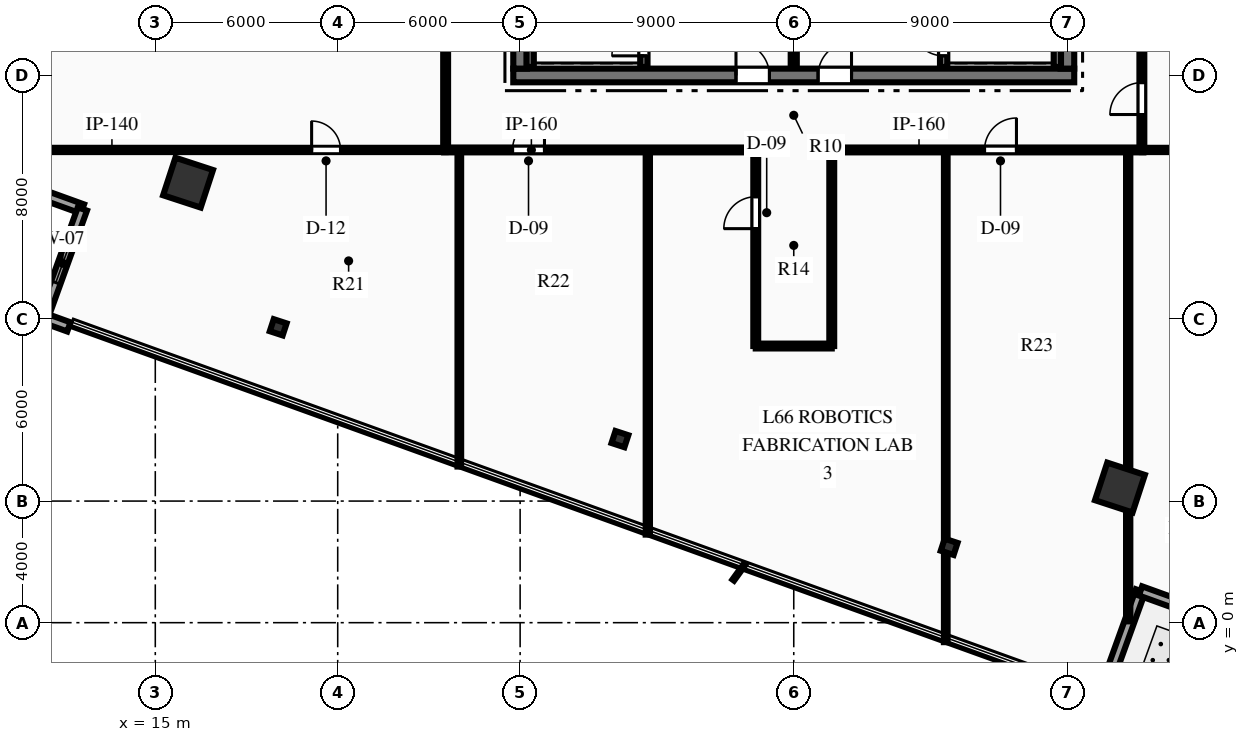
"""IFC4 building model, lengths in metres.
Left out: names, types, materials, properties, quantities, classifications, styles, units other than length and angle.
Written with IfcOpenShell. Run it as: python <this file> out.ifc"""

import sys

from ifc_helpers import new_model, si_unit, direction, frame, frame_2d, origin, origin_2d, place, context, subcontext, project, spatial, rectangle, hollow_rectangle, i_section, extrude, element, fill, save


model = new_model("IFC4")
c1 = context("Model", 3, precision=1e-05, world=origin(), true_north=direction((0.0, 1.0)))
c2 = subcontext(c1, "Body", "Model", "MODEL_VIEW")
j1 = project(units=[si_unit("LENGTHUNIT", "METRE"), si_unit("PLANEANGLEUNIT", "RADIAN")], contexts=[c1])
p1 = place(None, origin())
s1 = spatial("IfcSite", under=j1, at=p1, CompositionType="ELEMENT")
p2 = place(p1, origin())
s2 = spatial("IfcBuilding", under=s1, at=p2, CompositionType="ELEMENT")
p3 = place(p2, frame((0.0, 0.0, 263.7)))
s3 = spatial("IfcBuildingStorey", under=s2, at=p3, CompositionType="ELEMENT", Elevation=263.7)
p4 = place(p3, frame((26.775, 18.0, 0.0), z_axis=(0.0, 0.0, 1.0), x_axis=(1.0, 0.0, 0.0)))
e1 = element("IfcWall", 1, at=p4, inside=s3, PredefinedType="SHEAR", context=c2, shape_type="SweptSolid", body=[
    extrude(rectangle(XDim=18.45, YDim=0.45, at=frame_2d((9.225, 0.0))), origin(), (0.0, 0.0, 1.0), 3.75),
])
p5 = place(p4, frame((7.325, 0.0, 0.0)))
e2 = element("IfcOpeningElement", 2, at=p5, cuts=e1, PredefinedType="OPENING", context=c2, shape_type="SweptSolid", body=[
    extrude(rectangle(XDim=1.1, YDim=2.15, at=frame_2d((0.55, 1.075))), frame((0.0, 0.235, 0.0), z_axis=(0.0, -1.0, 0.0), x_axis=(1.0, 0.0, 0.0)), (0.0, 0.0, 1.0), 0.47),
])
p6 = place(p4, frame((10.025, 0.0, 0.0)))
e3 = element("IfcOpeningElement", 3, at=p6, cuts=e1, PredefinedType="OPENING", context=c2, shape_type="SweptSolid", body=[
    extrude(rectangle(XDim=1.1, YDim=2.15, at=frame_2d((0.55, 1.075))), frame((0.0, 0.235, 0.0), z_axis=(0.0, -1.0, 0.0), x_axis=(1.0, 0.0, 0.0)), (0.0, 0.0, 1.0), 0.47),
])
p7 = place(p3, frame((27.0, 18.225, 0.0), z_axis=(0.0, 0.0, 1.0), x_axis=(0.0, 1.0, 0.0)))
e4 = element("IfcWall", 4, at=p7, inside=s3, PredefinedType="SHEAR", context=c2, shape_type="SweptSolid", body=[
    extrude(rectangle(XDim=15.55, YDim=0.45, at=frame_2d((7.775, 0.0))), origin(), (0.0, 0.0, 1.0), 3.75),
])
p8 = place(p7, frame((10.015, 0.0, 0.0)))
e5 = element("IfcOpeningElement", 5, at=p8, cuts=e4, PredefinedType="OPENING", context=c2, shape_type="SweptSolid", body=[
    extrude(rectangle(XDim=1.4, YDim=2.2, at=frame_2d((0.7, 1.1))), frame((0.0, 0.235, 0.0), z_axis=(0.0, -1.0, 0.0), x_axis=(1.0, 0.0, 0.0)), (0.0, 0.0, 1.0), 0.47),
])
p9 = place(p3, frame((45.0, 18.225, 0.0), z_axis=(0.0, 0.0, 1.0), x_axis=(0.0, 1.0, 0.0)))
e6 = element("IfcWall", 6, at=p9, inside=s3, PredefinedType="SHEAR", context=c2, shape_type="SweptSolid", body=[
    extrude(rectangle(XDim=15.55, YDim=0.45, at=frame_2d((7.775, 0.0))), origin(), (0.0, 0.0, 1.0), 3.75),
])
p10 = place(p9, frame((10.015, 0.0, 0.0)))
e7 = element("IfcOpeningElement", 7, at=p10, cuts=e6, PredefinedType="OPENING", context=c2, shape_type="SweptSolid", body=[
    extrude(rectangle(XDim=1.4, YDim=2.2, at=frame_2d((0.7, 1.1))), frame((0.0, 0.235, 0.0), z_axis=(0.0, -1.0, 0.0), x_axis=(1.0, 0.0, 0.0)), (0.0, 0.0, 1.0), 0.47),
])
p11 = place(p3, frame((31.07, 18.28, 0.0), z_axis=(0.0, 0.0, 1.0), x_axis=(0.0, 1.0, 0.0)))
e8 = element("IfcWall", 8, at=p11, inside=s3, PredefinedType="SHEAR", context=c2, shape_type="SweptSolid", body=[
    extrude(rectangle(XDim=8.26, YDim=0.24, at=frame_2d((4.13, 0.0))), origin(), (0.0, 0.0, 1.0), 3.75),
])
p12 = place(p11, frame((0.365, 0.0, 0.0)))
e9 = element("IfcOpeningElement", 9, at=p12, cuts=e8, PredefinedType="OPENING", context=c2, shape_type="SweptSolid", body=[
    extrude(rectangle(XDim=1.05, YDim=2.15, at=frame_2d((0.525, 1.075))), frame((0.0, 0.13, 0.0), z_axis=(0.0, -1.0, 0.0), x_axis=(1.0, 0.0, 0.0)), (0.0, 0.0, 1.0), 0.26),
])
p13 = place(p3, frame((27.33, 18.28, 0.0), z_axis=(0.0, 0.0, 1.0), x_axis=(0.0, 1.0, 0.0)))
e10 = element("IfcWall", 10, at=p13, inside=s3, PredefinedType="SHEAR", context=c2, shape_type="SweptSolid", body=[
    extrude(rectangle(XDim=8.26, YDim=0.24, at=frame_2d((4.13, 0.0))), origin(), (0.0, 0.0, 1.0), 3.75),
])
p14 = place(p3, frame((40.93, 18.28, 0.0), z_axis=(0.0, 0.0, 1.0), x_axis=(0.0, 1.0, 0.0)))
e11 = element("IfcWall", 11, at=p14, inside=s3, PredefinedType="SHEAR", context=c2, shape_type="SweptSolid", body=[
    extrude(rectangle(XDim=8.26, YDim=0.24, at=frame_2d((4.13, 0.0))), origin(), (0.0, 0.0, 1.0), 3.75),
])
p15 = place(p14, frame((0.365, 0.0, 0.0)))
e12 = element("IfcOpeningElement", 12, at=p15, cuts=e11, PredefinedType="OPENING", context=c2, shape_type="SweptSolid", body=[
    extrude(rectangle(XDim=1.05, YDim=2.15, at=frame_2d((0.525, 1.075))), frame((0.0, 0.13, 0.0), z_axis=(0.0, -1.0, 0.0), x_axis=(1.0, 0.0, 0.0)), (0.0, 0.0, 1.0), 0.26),
])
p16 = place(p3, frame((44.67, 18.28, 0.0), z_axis=(0.0, 0.0, 1.0), x_axis=(0.0, 1.0, 0.0)))
e13 = element("IfcWall", 13, at=p16, inside=s3, PredefinedType="SHEAR", context=c2, shape_type="SweptSolid", body=[
    extrude(rectangle(XDim=8.26, YDim=0.24, at=frame_2d((4.13, 0.0))), origin(), (0.0, 0.0, 1.0), 3.75),
])
for number, where, z_axis, x_axis in (
    (14, (46.728, 4.445, 0.0), (0.0, 0.0, 1.0), (0.311, 0.95, 0.0)),
    (15, (16.077, 14.475, 0.0), (0.0, 0.0, 1.0), (0.311, 0.95, 0.0)),
):
    element("IfcColumn", number, at=place(p3, frame(where, z_axis=z_axis, x_axis=x_axis)), inside=s3, PredefinedType="COLUMN", context=c2, shape_type="SweptSolid", body=[
        extrude(hollow_rectangle(XDim=1.3, YDim=1.3, WallThickness=0.06, at=origin_2d()), origin(), (0.0, 0.0, 1.0), 3.75),
    ])
for number, where, z_axis, x_axis in (
    (16, (19.043, 9.716, 0.0), (0.0, 0.0, 1.0), (0.311, 0.95, 0.0)),
    (17, (30.283, 6.038, 0.0), (0.0, 0.0, 1.0), (0.311, 0.95, 0.0)),
    (18, (41.111, 2.495, 0.0), (0.0, 0.0, 1.0), (0.311, 0.95, 0.0)),
):
    element("IfcColumn", number, at=place(p3, frame(where, z_axis=z_axis, x_axis=x_axis)), inside=s3, PredefinedType="COLUMN", context=c2, shape_type="SweptSolid", body=[
        extrude(i_section(OverallWidth=0.416, OverallDepth=0.445, WebThickness=0.039, FlangeThickness=0.063, at=origin_2d()), origin(), (0.0, 0.0, 1.0), 3.75),
    ])
p17 = place(p3, frame((12.602, 13.609, 0.0), z_axis=(0.0, 0.0, 1.0), x_axis=(-0.940588101953, 0.339549734892, 0.0)))
e19 = element("IfcWall", 19, at=p17, inside=s3, PredefinedType="STANDARD", context=c2, shape_type="SweptSolid", body=[
    extrude(rectangle(XDim=3.8, YDim=0.32, at=frame_2d((1.9, 0.0))), origin(), (0.0, 0.0, 1.0), 3.48),
])
p18 = place(p3, frame((11.312, 10.034, 0.0), z_axis=(0.0, 0.0, 1.0), x_axis=(0.339549734892, 0.940588101953, 0.0)))
e20 = element("IfcWall", 20, at=p18, inside=s3, PredefinedType="STANDARD", context=c2, shape_type="SweptSolid", body=[
    extrude(rectangle(XDim=3.8, YDim=0.32, at=frame_2d((1.9, 0.0))), origin(), (0.0, 0.0, 1.0), 3.48),
])
p19 = place(p18, frame((1.225, 0.0, 0.85)))
e21 = element("IfcOpeningElement", 21, at=p19, cuts=e20, PredefinedType="OPENING", context=c2, shape_type="SweptSolid", body=[
    extrude(rectangle(XDim=1.35, YDim=1.95, at=frame_2d((0.675, 0.975))), frame((0.0, 0.17, 0.0), z_axis=(0.0, -1.0, 0.0), x_axis=(1.0, 0.0, 0.0)), (0.0, 0.0, 1.0), 0.34),
])
p20 = place(p3, frame((12.158, 9.729, 0.0), z_axis=(0.0, 0.0, 1.0), x_axis=(-0.940638134831, 0.339411106626, 0.0)))
e22 = element("IfcWall", 22, at=p20, inside=s3, PredefinedType="STANDARD", context=c2, shape_type="SweptSolid", body=[
    extrude(rectangle(XDim=0.9, YDim=0.32, at=frame_2d((0.45, 0.0))), origin(), (0.0, 0.0, 1.0), 3.48),
])
p21 = place(p3, frame((47.404, 1.045, 0.0), z_axis=(0.0, 0.0, 1.0), x_axis=(-0.339549734892, -0.940588101953, 0.0)))
e23 = element("IfcWall", 23, at=p21, inside=s3, PredefinedType="STANDARD", context=c2, shape_type="SweptSolid", body=[
    extrude(rectangle(XDim=3.8, YDim=0.32, at=frame_2d((1.9, 0.0))), origin(), (0.0, 0.0, 1.0), 3.48),
])
p22 = place(p3, frame((50.978, -0.245, 0.0), z_axis=(0.0, 0.0, 1.0), x_axis=(-0.940588101953, 0.339549734892, 0.0)))
e24 = element("IfcWall", 24, at=p22, inside=s3, PredefinedType="STANDARD", context=c2, shape_type="SweptSolid", body=[
    extrude(rectangle(XDim=3.8, YDim=0.32, at=frame_2d((1.9, 0.0))), origin(), (0.0, 0.0, 1.0), 3.48),
])
p23 = place(p22, frame((1.325, 0.0, 0.0)))
e25 = element("IfcOpeningElement", 25, at=p23, cuts=e24, PredefinedType="OPENING", context=c2, shape_type="SweptSolid", body=[
    extrude(rectangle(XDim=1.15, YDim=2.2, at=frame_2d((0.575, 1.1))), frame((0.0, 0.17, 0.0), z_axis=(0.0, -1.0, 0.0), x_axis=(1.0, 0.0, 0.0)), (0.0, 0.0, 1.0), 0.34),
])
p24 = place(p3, frame((36.0, 18.28, 0.0), z_axis=(0.0, 0.0, 1.0), x_axis=(0.0, 1.0, 0.0)))
e26 = element("IfcWall", 26, at=p24, inside=s3, PredefinedType="PARTITIONING", context=c2, shape_type="SweptSolid", body=[
    extrude(rectangle(XDim=3.77, YDim=0.2, at=frame_2d((1.885, 0.0))), origin(), (0.0, 0.0, 1.0), 3.48),
])
p25 = place(p3, frame((24.5, 15.55, 0.0), z_axis=(0.0, 0.0, 1.0), x_axis=(1.0, 0.0, 0.0)))
e27 = element("IfcWall", 27, at=p25, inside=s3, PredefinedType="PARTITIONING", context=c2, shape_type="SweptSolid", body=[
    extrude(rectangle(XDim=10.25, YDim=0.16, at=frame_2d((5.125, 0.0))), origin(), (0.0, 0.0, 1.0), 3.48),
])
p26 = place(p25, frame((2.251, 0.0, 0.0)))
e28 = element("IfcOpeningElement", 28, at=p26, cuts=e27, PredefinedType="OPENING", context=c2, shape_type="SweptSolid", body=[
    extrude(rectangle(XDim=1.05, YDim=2.15, at=frame_2d((0.525, 1.075))), frame((0.0, 0.09, 0.0), z_axis=(0.0, -1.0, 0.0), x_axis=(1.0, 0.0, 0.0)), (0.0, 0.0, 1.0), 0.18),
])
p27 = place(p3, frame((37.25, 15.55, 0.0), z_axis=(0.0, 0.0, 1.0), x_axis=(1.0, 0.0, 0.0)))
e29 = element("IfcWall", 29, at=p27, inside=s3, PredefinedType="PARTITIONING", context=c2, shape_type="SweptSolid", body=[
    extrude(rectangle(XDim=10.25, YDim=0.16, at=frame_2d((5.125, 0.0))), origin(), (0.0, 0.0, 1.0), 3.48),
])
p28 = place(p27, frame((5.025, 0.0, 0.0)))
e30 = element("IfcOpeningElement", 30, at=p28, cuts=e29, PredefinedType="OPENING", context=c2, shape_type="SweptSolid", body=[
    extrude(rectangle(XDim=1.05, YDim=2.15, at=frame_2d((0.525, 1.075))), frame((0.0, 0.09, 0.0), z_axis=(0.0, -1.0, 0.0), x_axis=(1.0, 0.0, 0.0)), (0.0, 0.0, 1.0), 0.18),
])
p29 = place(p3, frame((24.55, 15.55, 0.0), z_axis=(0.0, 0.0, 1.0), x_axis=(0.0, 1.0, 0.0)))
e31 = element("IfcWall", 31, at=p29, inside=s3, PredefinedType="PARTITIONING", context=c2, shape_type="SweptSolid", body=[
    extrude(rectangle(XDim=9.2, YDim=0.16, at=frame_2d((4.6, 0.0))), origin(), (0.0, 0.0, 1.0), 3.48),
])
p30 = place(p3, frame((47.45, 15.55, 0.0), z_axis=(0.0, 0.0, 1.0), x_axis=(0.0, 1.0, 0.0)))
e32 = element("IfcWall", 32, at=p30, inside=s3, PredefinedType="PARTITIONING", context=c2, shape_type="SweptSolid", body=[
    extrude(rectangle(XDim=9.2, YDim=0.16, at=frame_2d((4.6, 0.0))), origin(), (0.0, 0.0, 1.0), 3.48),
])
p31 = place(p30, frame((1.165, 0.0, 0.0)))
e33 = element("IfcOpeningElement", 33, at=p31, cuts=e32, PredefinedType="OPENING", context=c2, shape_type="SweptSolid", body=[
    extrude(rectangle(XDim=1.05, YDim=2.15, at=frame_2d((0.525, 1.075))), frame((0.0, 0.09, 0.0), z_axis=(0.0, -1.0, 0.0), x_axis=(1.0, 0.0, 0.0)), (0.0, 0.0, 1.0), 0.18),
])
p32 = place(p3, frame((34.75, 9.1, 0.0), z_axis=(0.0, 0.0, 1.0), x_axis=(0.0, 1.0, 0.0)))
e34 = element("IfcWall", 34, at=p32, inside=s3, PredefinedType="PARTITIONING", context=c2, shape_type="SweptSolid", body=[
    extrude(rectangle(XDim=6.45, YDim=0.16, at=frame_2d((3.225, 0.0))), origin(), (0.0, 0.0, 1.0), 3.48),
])
p33 = place(p32, frame((3.861, 0.0, 0.0)))
e35 = element("IfcOpeningElement", 35, at=p33, cuts=e34, PredefinedType="OPENING", context=c2, shape_type="SweptSolid", body=[
    extrude(rectangle(XDim=1.05, YDim=2.15, at=frame_2d((0.525, 1.075))), frame((0.0, 0.09, 0.0), z_axis=(0.0, -1.0, 0.0), x_axis=(1.0, 0.0, 0.0)), (0.0, 0.0, 1.0), 0.18),
])
p34 = place(p3, frame((37.25, 9.1, 0.0), z_axis=(0.0, 0.0, 1.0), x_axis=(0.0, 1.0, 0.0)))
e36 = element("IfcWall", 36, at=p34, inside=s3, PredefinedType="PARTITIONING", context=c2, shape_type="SweptSolid", body=[
    extrude(rectangle(XDim=6.45, YDim=0.16, at=frame_2d((3.225, 0.0))), origin(), (0.0, 0.0, 1.0), 3.48),
])
p35 = place(p3, frame((34.75, 9.1, 0.0), z_axis=(0.0, 0.0, 1.0), x_axis=(1.0, 0.0, 0.0)))
e37 = element("IfcWall", 37, at=p35, inside=s3, PredefinedType="PARTITIONING", context=c2, shape_type="SweptSolid", body=[
    extrude(rectangle(XDim=2.5, YDim=0.16, at=frame_2d((1.25, 0.0))), origin(), (0.0, 0.0, 1.0), 3.48),
])
p36 = place(p3, frame((9.305, 15.55, 0.0), z_axis=(0.0, 0.0, 1.0), x_axis=(1.0, 0.0, 0.0)))
e38 = element("IfcWall", 38, at=p36, inside=s3, PredefinedType="PARTITIONING", context=c2, shape_type="SweptSolid", body=[
    extrude(rectangle(XDim=15.245, YDim=0.14, at=frame_2d((7.622, 0.0))), origin(), (0.0, 0.0, 1.0), 2.858),
])
p37 = place(p36, frame((10.836, 0.0, 0.0)))
e39 = element("IfcOpeningElement", 39, at=p37, cuts=e38, PredefinedType="OPENING", context=c2, shape_type="SweptSolid", body=[
    extrude(rectangle(XDim=0.95, YDim=2.15, at=frame_2d((0.475, 1.075))), frame((0.0, 0.08, 0.0), z_axis=(0.0, -1.0, 0.0), x_axis=(1.0, 0.0, 0.0)), (0.0, 0.0, 1.0), 0.16),
])
p38 = place(p3, frame((47.45, 15.55, 0.0), z_axis=(0.0, 0.0, 1.0), x_axis=(1.0, 0.0, 0.0)))
e40 = element("IfcWall", 40, at=p38, inside=s3, PredefinedType="PARTITIONING", context=c2, shape_type="SweptSolid", body=[
    extrude(rectangle(XDim=9.188, YDim=0.14, at=frame_2d((4.594, 0.0))), origin(), (0.0, 0.0, 1.0), 3.48),
])
p39 = place(p38, frame((1.983, 0.0, 0.0)))
e41 = element("IfcOpeningElement", 41, at=p39, cuts=e40, PredefinedType="OPENING", context=c2, shape_type="SweptSolid", body=[
    extrude(rectangle(XDim=0.95, YDim=2.15, at=frame_2d((0.475, 1.075))), frame((0.0, 0.08, 0.0), z_axis=(0.0, -1.0, 0.0), x_axis=(1.0, 0.0, 0.0)), (0.0, 0.0, 1.0), 0.16),
])
p40 = place(p3, frame((25.0, 5.135, 0.0), z_axis=(0.0, 0.0, 1.0), x_axis=(0.0, 1.0, 0.0)))
e42 = element("IfcWall", 42, at=p40, inside=s3, PredefinedType="PARTITIONING", context=c2, shape_type="SweptSolid", body=[
    extrude(rectangle(XDim=10.415, YDim=0.12, at=frame_2d((5.207, 0.0))), origin(), (0.0, 0.0, 1.0), 3.48),
])
p41 = place(p3, frame((31.2, 2.897, 0.0), z_axis=(0.0, 0.0, 1.0), x_axis=(0.0, 1.0, 0.0)))
e43 = element("IfcWall", 43, at=p41, inside=s3, PredefinedType="PARTITIONING", context=c2, shape_type="SweptSolid", body=[
    extrude(rectangle(XDim=12.653, YDim=0.14, at=frame_2d((6.326, 0.0))), origin(), (0.0, 0.0, 1.0), 3.48),
])
p42 = place(p3, frame((41.0, -0.641, 0.0), z_axis=(0.0, 0.0, 1.0), x_axis=(0.0, 1.0, 0.0)))
e44 = element("IfcWall", 44, at=p42, inside=s3, PredefinedType="PARTITIONING", context=c2, shape_type="SweptSolid", body=[
    extrude(rectangle(XDim=16.191, YDim=0.12, at=frame_2d((8.095, 0.0))), origin(), (0.0, 0.0, 1.0), 2.858),
])
p43 = place(p3, frame((47.0, 0.044, 0.0), z_axis=(0.0, 0.0, 1.0), x_axis=(0.0, 1.0, 0.0)))
e45 = element("IfcWall", 45, at=p43, inside=s3, PredefinedType="PARTITIONING", context=c2, shape_type="SweptSolid", body=[
    extrude(rectangle(XDim=15.506, YDim=0.14, at=frame_2d((7.753, 0.0))), origin(), (0.0, 0.0, 1.0), 3.48),
])
p44 = place(p19, origin())
e46 = element("IfcWindow", 46, at=p44, inside=s3, PartitioningType="SINGLE_PANEL", PredefinedType="WINDOW", context=c2, shape_type="SweptSolid", body=[
    extrude(rectangle(XDim=1.35, YDim=1.95, at=frame_2d((0.675, 0.975))), frame((0.0, 0.03, 0.0), z_axis=(0.0, -1.0, 0.0), x_axis=(1.0, 0.0, 0.0)), (0.0, 0.0, 1.0), 0.06),
])
fill(e21, e46)
p45 = place(p12, origin())
e47 = element("IfcDoor", 47, at=p45, inside=s3, OperationType="SINGLE_SWING_LEFT", PredefinedType="DOOR", context=c2, shape_type="SweptSolid", body=[
    extrude(rectangle(XDim=1.05, YDim=2.15, at=frame_2d((0.525, 1.075))), frame((0.0, 0.025, 0.0), z_axis=(0.0, -1.0, 0.0), x_axis=(1.0, 0.0, 0.0)), (0.0, 0.0, 1.0), 0.05),
])
fill(e9, e47)
p46 = place(p15, origin())
e48 = element("IfcDoor", 48, at=p46, inside=s3, OperationType="SINGLE_SWING_RIGHT", PredefinedType="DOOR", context=c2, shape_type="SweptSolid", body=[
    extrude(rectangle(XDim=1.05, YDim=2.15, at=frame_2d((0.525, 1.075))), frame((0.0, 0.025, 0.0), z_axis=(0.0, -1.0, 0.0), x_axis=(1.0, 0.0, 0.0)), (0.0, 0.0, 1.0), 0.05),
])
fill(e12, e48)
p47 = place(p5, origin())
e49 = element("IfcDoor", 49, at=p47, inside=s3, OperationType="SINGLE_SWING_LEFT", PredefinedType="DOOR", context=c2, shape_type="SweptSolid", body=[
    extrude(rectangle(XDim=1.1, YDim=2.15, at=frame_2d((0.55, 1.075))), frame((0.0, 0.025, 0.0), z_axis=(0.0, -1.0, 0.0), x_axis=(1.0, 0.0, 0.0)), (0.0, 0.0, 1.0), 0.05),
])
fill(e2, e49)
p48 = place(p6, origin())
e50 = element("IfcDoor", 50, at=p48, inside=s3, OperationType="SINGLE_SWING_RIGHT", PredefinedType="DOOR", context=c2, shape_type="SweptSolid", body=[
    extrude(rectangle(XDim=1.1, YDim=2.15, at=frame_2d((0.55, 1.075))), frame((0.0, 0.025, 0.0), z_axis=(0.0, -1.0, 0.0), x_axis=(1.0, 0.0, 0.0)), (0.0, 0.0, 1.0), 0.05),
])
fill(e3, e50)
p49 = place(p37, origin())
e51 = element("IfcDoor", 51, at=p49, inside=s3, OperationType="SINGLE_SWING_LEFT", PredefinedType="DOOR", context=c2, shape_type="SweptSolid", body=[
    extrude(rectangle(XDim=0.95, YDim=2.15, at=frame_2d((0.475, 1.075))), frame((0.0, 0.025, 0.0), z_axis=(0.0, -1.0, 0.0), x_axis=(1.0, 0.0, 0.0)), (0.0, 0.0, 1.0), 0.05),
])
fill(e39, e51)
p50 = place(p26, origin())
e52 = element("IfcDoor", 52, at=p50, inside=s3, OperationType="SINGLE_SWING_RIGHT", PredefinedType="DOOR", context=c2, shape_type="SweptSolid", body=[
    extrude(rectangle(XDim=1.05, YDim=2.15, at=frame_2d((0.525, 1.075))), frame((0.0, 0.025, 0.0), z_axis=(0.0, -1.0, 0.0), x_axis=(1.0, 0.0, 0.0)), (0.0, 0.0, 1.0), 0.05),
])
fill(e28, e52)
p51 = place(p33, origin())
e53 = element("IfcDoor", 53, at=p51, inside=s3, OperationType="SINGLE_SWING_LEFT", PredefinedType="DOOR", context=c2, shape_type="SweptSolid", body=[
    extrude(rectangle(XDim=1.05, YDim=2.15, at=frame_2d((0.525, 1.075))), frame((0.0, 0.025, 0.0), z_axis=(0.0, -1.0, 0.0), x_axis=(1.0, 0.0, 0.0)), (0.0, 0.0, 1.0), 0.05),
])
fill(e35, e53)
p52 = place(p28, origin())
e54 = element("IfcDoor", 54, at=p52, inside=s3, OperationType="SINGLE_SWING_RIGHT", PredefinedType="DOOR", context=c2, shape_type="SweptSolid", body=[
    extrude(rectangle(XDim=1.05, YDim=2.15, at=frame_2d((0.525, 1.075))), frame((0.0, 0.025, 0.0), z_axis=(0.0, -1.0, 0.0), x_axis=(1.0, 0.0, 0.0)), (0.0, 0.0, 1.0), 0.05),
])
fill(e30, e54)
p53 = place(p31, origin())
e55 = element("IfcDoor", 55, at=p53, inside=s3, OperationType="SINGLE_SWING_LEFT", PredefinedType="DOOR", context=c2, shape_type="SweptSolid", body=[
    extrude(rectangle(XDim=1.05, YDim=2.15, at=frame_2d((0.525, 1.075))), frame((0.0, 0.025, 0.0), z_axis=(0.0, -1.0, 0.0), x_axis=(1.0, 0.0, 0.0)), (0.0, 0.0, 1.0), 0.05),
])
fill(e33, e55)
save(model, sys.argv[1])
